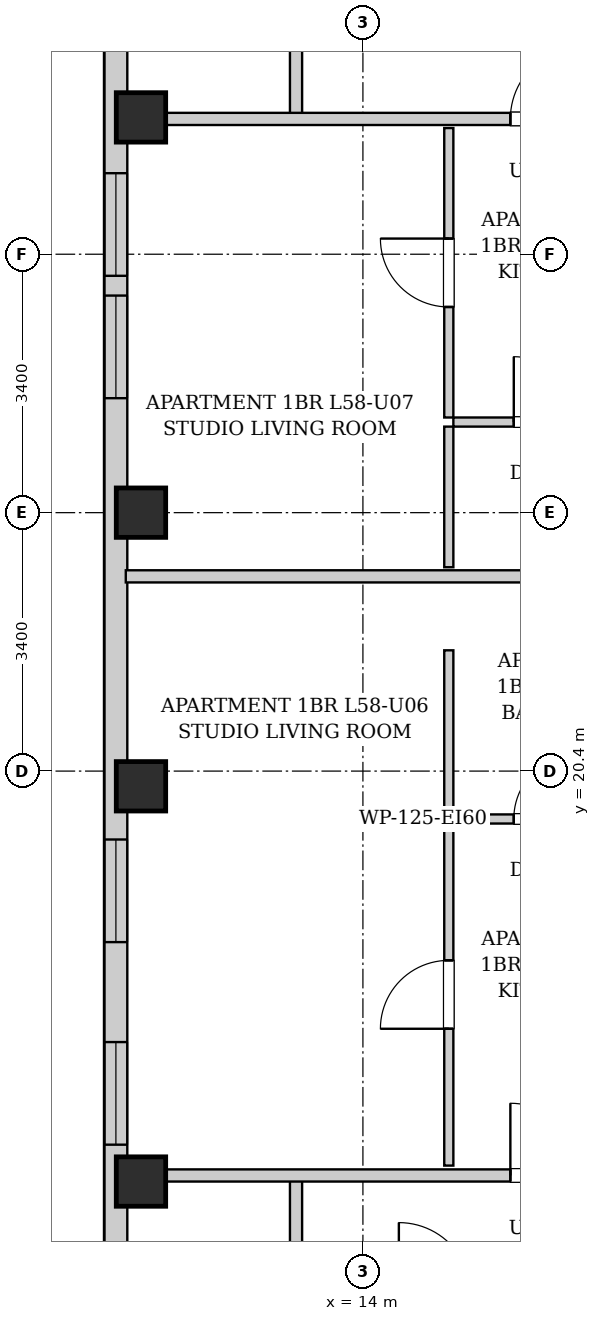
"""IFC4 building model, lengths in metres.
Left out: names, types, materials, properties, quantities, classifications, styles, units other than length and angle.
Written with IfcOpenShell. Run it as: python <this file> out.ifc"""

import sys

from ifc_helpers import new_model, si_unit, direction, frame, frame_2d, origin, origin_2d, place, context, subcontext, project, spatial, rectangle, extrude, element, fill, save


model = new_model("IFC4")
c1 = context("Model", 3, precision=1e-05, world=origin(), true_north=direction((0.0, 1.0)))
c2 = subcontext(c1, "Body", "Model", "MODEL_VIEW")
j1 = project(units=[si_unit("LENGTHUNIT", "METRE"), si_unit("PLANEANGLEUNIT", "RADIAN")], contexts=[c1])
p1 = place(None, origin())
s1 = spatial("IfcSite", under=j1, at=p1, CompositionType="ELEMENT")
p2 = place(p1, origin())
s2 = spatial("IfcBuilding", under=s1, at=p2, CompositionType="ELEMENT")
p3 = place(p2, frame((0.0, 0.0, 200.8)))
s3 = spatial("IfcBuildingStorey", under=s2, at=p3, CompositionType="ELEMENT", Elevation=200.8)
for number, where, z_axis, x_axis in (
    (1, (11.08, 15.0, 0.0), (0.0, 0.0, 1.0), (1.0, 0.0, 0.0)),
    (2, (11.08, 20.2, 0.0), (0.0, 0.0, 1.0), (1.0, 0.0, 0.0)),
    (3, (11.08, 23.8, 0.0), (0.0, 0.0, 1.0), (1.0, 0.0, 0.0)),
    (4, (11.08, 29.0, 0.0), (0.0, 0.0, 1.0), (1.0, 0.0, 0.0)),
):
    element("IfcColumn", number, at=place(p3, frame(where, z_axis=z_axis, x_axis=x_axis)), inside=s3, PredefinedType="COLUMN", context=c2, shape_type="SweptSolid", body=[
        extrude(rectangle(XDim=0.65, YDim=0.65, at=origin_2d()), origin(), (0.0, 0.0, 1.0), 3.3),
    ])
p4 = place(p3, frame((10.75, 6.3, 0.0), z_axis=(0.0, 0.0, 1.0), x_axis=(0.0, 1.0, 0.0)))
e5 = element("IfcWall", 5, at=p4, inside=s3, PredefinedType="SOLIDWALL", context=c2, shape_type="SweptSolid", body=[
    extrude(rectangle(XDim=31.4, YDim=0.3, at=frame_2d((15.7, 0.0))), origin(), (0.0, 0.0, 1.0), 3.04),
])
p5 = place(p4, frame((1.504, 0.0, 0.55)))
e6 = element("IfcOpeningElement", 6, at=p5, cuts=e5, PredefinedType="OPENING", context=c2, shape_type="SweptSolid", body=[
    extrude(rectangle(XDim=1.35, YDim=1.2, at=frame_2d((0.675, 0.6))), frame((0.0, 0.16, 0.0), z_axis=(0.0, -1.0, 0.0), x_axis=(1.0, 0.0, 0.0)), (0.0, 0.0, 1.0), 0.32),
])
p6 = place(p4, frame((28.546, 0.0, 0.55)))
e7 = element("IfcOpeningElement", 7, at=p6, cuts=e5, PredefinedType="OPENING", context=c2, shape_type="SweptSolid", body=[
    extrude(rectangle(XDim=1.35, YDim=1.2, at=frame_2d((0.675, 0.6))), frame((0.0, 0.16, 0.0), z_axis=(0.0, -1.0, 0.0), x_axis=(1.0, 0.0, 0.0)), (0.0, 0.0, 1.0), 0.32),
])
p7 = place(p4, frame((11.85, 0.0, 0.55)))
e8 = element("IfcOpeningElement", 8, at=p7, cuts=e5, PredefinedType="OPENING", context=c2, shape_type="SweptSolid", body=[
    extrude(rectangle(XDim=1.35, YDim=1.2, at=frame_2d((0.675, 0.6))), frame((0.0, 0.16, 0.0), z_axis=(0.0, -1.0, 0.0), x_axis=(1.0, 0.0, 0.0)), (0.0, 0.0, 1.0), 0.32),
])
p8 = place(p4, frame((9.185, 0.0, 0.55)))
e9 = element("IfcOpeningElement", 9, at=p8, cuts=e5, PredefinedType="OPENING", context=c2, shape_type="SweptSolid", body=[
    extrude(rectangle(XDim=1.35, YDim=1.2, at=frame_2d((0.675, 0.6))), frame((0.0, 0.16, 0.0), z_axis=(0.0, -1.0, 0.0), x_axis=(1.0, 0.0, 0.0)), (0.0, 0.0, 1.0), 0.32),
])
p9 = place(p4, frame((19.006, 0.0, 0.55)))
e10 = element("IfcOpeningElement", 10, at=p9, cuts=e5, PredefinedType="OPENING", context=c2, shape_type="SweptSolid", body=[
    extrude(rectangle(XDim=1.35, YDim=1.2, at=frame_2d((0.675, 0.6))), frame((0.0, 0.16, 0.0), z_axis=(0.0, -1.0, 0.0), x_axis=(1.0, 0.0, 0.0)), (0.0, 0.0, 1.0), 0.32),
])
p10 = place(p4, frame((20.616, 0.0, 0.55)))
e11 = element("IfcOpeningElement", 11, at=p10, cuts=e5, PredefinedType="OPENING", context=c2, shape_type="SweptSolid", body=[
    extrude(rectangle(XDim=1.35, YDim=1.2, at=frame_2d((0.675, 0.6))), frame((0.0, 0.16, 0.0), z_axis=(0.0, -1.0, 0.0), x_axis=(1.0, 0.0, 0.0)), (0.0, 0.0, 1.0), 0.32),
])
for number, where, z_axis, x_axis in (
    (12, (13.12, 13.51, 0.0), (0.0, 0.0, 1.0), (0.0, 1.0, 0.0)),
    (13, (13.12, 28.98, 0.0), (0.0, 0.0, 1.0), (0.0, 1.0, 0.0)),
):
    element("IfcWall", number, at=place(p3, frame(where, z_axis=z_axis, x_axis=x_axis)), inside=s3, PredefinedType="PARTITIONING", context=c2, shape_type="SweptSolid", body=[
        extrude(rectangle(XDim=1.58, YDim=0.16, at=frame_2d((0.79, 0.0))), origin(), (0.0, 0.0, 1.0), 3.04),
    ])
p11 = place(p3, frame((10.88, 15.08, 0.0), z_axis=(0.0, 0.0, 1.0), x_axis=(1.0, 0.0, 0.0)))
e14 = element("IfcWall", 14, at=p11, inside=s3, PredefinedType="PARTITIONING", context=c2, shape_type="SweptSolid", body=[
    extrude(rectangle(XDim=6.88, YDim=0.16, at=frame_2d((3.44, 0.0))), origin(), (0.0, 0.0, 1.0), 2.556),
])
p12 = place(p11, frame((5.06, 0.0, 0.0)))
e15 = element("IfcOpeningElement", 15, at=p12, cuts=e14, PredefinedType="OPENING", context=c2, shape_type="SweptSolid", body=[
    extrude(rectangle(XDim=0.95, YDim=2.1, at=frame_2d((0.475, 1.05))), frame((0.0, 0.09, 0.0), z_axis=(0.0, -1.0, 0.0), x_axis=(1.0, 0.0, 0.0)), (0.0, 0.0, 1.0), 0.18),
])
p13 = place(p3, frame((10.88, 22.962, 0.0), z_axis=(0.0, 0.0, 1.0), x_axis=(1.0, 0.0, 0.0)))
e16 = element("IfcWall", 16, at=p13, inside=s3, PredefinedType="PARTITIONING", context=c2, shape_type="SweptSolid", body=[
    extrude(rectangle(XDim=6.76, YDim=0.16, at=frame_2d((3.38, 0.0))), origin(), (0.0, 0.0, 1.0), 3.04),
])
p14 = place(p3, frame((15.19, 19.77, 0.0), z_axis=(0.0, 0.0, 1.0), x_axis=(1.0, 0.0, 0.0)))
e17 = element("IfcWall", 17, at=p14, inside=s3, PredefinedType="PARTITIONING", context=c2, shape_type="SweptSolid", body=[
    extrude(rectangle(XDim=2.45, YDim=0.12, at=frame_2d((1.225, 0.0))), origin(), (0.0, 0.0, 1.0), 3.04),
])
p15 = place(p14, frame((0.795, 0.0, 0.0)))
e18 = element("IfcOpeningElement", 18, at=p15, cuts=e17, PredefinedType="OPENING", context=c2, shape_type="SweptSolid", body=[
    extrude(rectangle(XDim=0.86, YDim=2.05, at=frame_2d((0.43, 1.025))), frame((0.0, 0.07, 0.0), z_axis=(0.0, -1.0, 0.0), x_axis=(1.0, 0.0, 0.0)), (0.0, 0.0, 1.0), 0.14),
])
p16 = place(p3, frame((15.13, 19.83, 0.0), z_axis=(0.0, 0.0, 1.0), x_axis=(0.0, 1.0, 0.0)))
e19 = element("IfcWall", 19, at=p16, inside=s3, PredefinedType="PARTITIONING", context=c2, shape_type="SweptSolid", body=[
    extrude(rectangle(XDim=2.159, YDim=0.12, at=frame_2d((1.08, 0.0))), origin(), (0.0, 0.0, 1.0), 3.04),
])
p17 = place(p3, frame((15.13, 15.21, 0.0), z_axis=(0.0, 0.0, 1.0), x_axis=(0.0, 1.0, 0.0)))
e20 = element("IfcWall", 20, at=p17, inside=s3, PredefinedType="PARTITIONING", context=c2, shape_type="SweptSolid", body=[
    extrude(rectangle(XDim=4.5, YDim=0.12, at=frame_2d((2.25, 0.0))), origin(), (0.0, 0.0, 1.0), 3.04),
])
p18 = place(p17, frame((1.8, 0.0, 0.0)))
e21 = element("IfcOpeningElement", 21, at=p18, cuts=e20, PredefinedType="OPENING", context=c2, shape_type="SweptSolid", body=[
    extrude(rectangle(XDim=0.9, YDim=2.05, at=frame_2d((0.45, 1.025))), frame((0.0, 0.07, 0.0), z_axis=(0.0, -1.0, 0.0), x_axis=(1.0, 0.0, 0.0)), (0.0, 0.0, 1.0), 0.14),
])
p19 = place(p3, frame((10.88, 28.98, 0.0), z_axis=(0.0, 0.0, 1.0), x_axis=(1.0, 0.0, 0.0)))
e22 = element("IfcWall", 22, at=p19, inside=s3, PredefinedType="PARTITIONING", context=c2, shape_type="SweptSolid", body=[
    extrude(rectangle(XDim=6.88, YDim=0.16, at=frame_2d((3.44, 0.0))), origin(), (0.0, 0.0, 1.0), 2.556),
])
p20 = place(p19, frame((5.06, 0.0, 0.0)))
e23 = element("IfcOpeningElement", 23, at=p20, cuts=e22, PredefinedType="OPENING", context=c2, shape_type="SweptSolid", body=[
    extrude(rectangle(XDim=0.95, YDim=2.1, at=frame_2d((0.475, 1.05))), frame((0.0, 0.09, 0.0), z_axis=(0.0, -1.0, 0.0), x_axis=(1.0, 0.0, 0.0)), (0.0, 0.0, 1.0), 0.18),
])
p21 = place(p3, frame((15.19, 24.992, 0.0), z_axis=(0.0, 0.0, 1.0), x_axis=(1.0, 0.0, 0.0)))
e24 = element("IfcWall", 24, at=p21, inside=s3, PredefinedType="PARTITIONING", context=c2, shape_type="SweptSolid", body=[
    extrude(rectangle(XDim=2.45, YDim=0.12, at=frame_2d((1.225, 0.0))), origin(), (0.0, 0.0, 1.0), 3.04),
])
p22 = place(p21, frame((0.795, 0.0, 0.0)))
e25 = element("IfcOpeningElement", 25, at=p22, cuts=e24, PredefinedType="OPENING", context=c2, shape_type="SweptSolid", body=[
    extrude(rectangle(XDim=0.86, YDim=2.05, at=frame_2d((0.43, 1.025))), frame((0.0, 0.07, 0.0), z_axis=(0.0, -1.0, 0.0), x_axis=(1.0, 0.0, 0.0)), (0.0, 0.0, 1.0), 0.14),
])
p23 = place(p3, frame((15.13, 23.082, 0.0), z_axis=(0.0, 0.0, 1.0), x_axis=(0.0, 1.0, 0.0)))
e26 = element("IfcWall", 26, at=p23, inside=s3, PredefinedType="PARTITIONING", context=c2, shape_type="SweptSolid", body=[
    extrude(rectangle(XDim=1.85, YDim=0.12, at=frame_2d((0.925, 0.0))), origin(), (0.0, 0.0, 1.0), 3.04),
])
p24 = place(p3, frame((15.13, 25.052, 0.0), z_axis=(0.0, 0.0, 1.0), x_axis=(0.0, 1.0, 0.0)))
e27 = element("IfcWall", 27, at=p24, inside=s3, PredefinedType="PARTITIONING", context=c2, shape_type="SweptSolid", body=[
    extrude(rectangle(XDim=3.808, YDim=0.12, at=frame_2d((1.904, 0.0))), origin(), (0.0, 0.0, 1.0), 3.04),
])
p25 = place(p24, frame((1.454, 0.0, 0.0)))
e28 = element("IfcOpeningElement", 28, at=p25, cuts=e27, PredefinedType="OPENING", context=c2, shape_type="SweptSolid", body=[
    extrude(rectangle(XDim=0.9, YDim=2.05, at=frame_2d((0.45, 1.025))), frame((0.0, 0.07, 0.0), z_axis=(0.0, -1.0, 0.0), x_axis=(1.0, 0.0, 0.0)), (0.0, 0.0, 1.0), 0.14),
])
p26 = place(p12, origin())
e29 = element("IfcDoor", 29, at=p26, inside=s3, OperationType="SINGLE_SWING_LEFT", PredefinedType="DOOR", context=c2, shape_type="SweptSolid", body=[
    extrude(rectangle(XDim=0.95, YDim=2.1, at=frame_2d((0.475, 1.05))), frame((0.0, 0.025, 0.0), z_axis=(0.0, -1.0, 0.0), x_axis=(1.0, 0.0, 0.0)), (0.0, 0.0, 1.0), 0.05),
])
fill(e15, e29)
p27 = place(p15, origin())
e30 = element("IfcDoor", 30, at=p27, inside=s3, OperationType="SINGLE_SWING_RIGHT", PredefinedType="DOOR", context=c2, shape_type="SweptSolid", body=[
    extrude(rectangle(XDim=0.86, YDim=2.05, at=frame_2d((0.43, 1.025))), frame((0.0, 0.025, 0.0), z_axis=(0.0, -1.0, 0.0), x_axis=(1.0, 0.0, 0.0)), (0.0, 0.0, 1.0), 0.05),
])
fill(e18, e30)
p28 = place(p18, origin())
e31 = element("IfcDoor", 31, at=p28, inside=s3, OperationType="SINGLE_SWING_LEFT", PredefinedType="DOOR", context=c2, shape_type="SweptSolid", body=[
    extrude(rectangle(XDim=0.9, YDim=2.05, at=frame_2d((0.45, 1.025))), frame((0.0, 0.025, 0.0), z_axis=(0.0, -1.0, 0.0), x_axis=(1.0, 0.0, 0.0)), (0.0, 0.0, 1.0), 0.05),
])
fill(e21, e31)
p29 = place(p20, origin())
e32 = element("IfcDoor", 32, at=p29, inside=s3, OperationType="SINGLE_SWING_RIGHT", PredefinedType="DOOR", context=c2, shape_type="SweptSolid", body=[
    extrude(rectangle(XDim=0.95, YDim=2.1, at=frame_2d((0.475, 1.05))), frame((0.0, 0.025, 0.0), z_axis=(0.0, -1.0, 0.0), x_axis=(1.0, 0.0, 0.0)), (0.0, 0.0, 1.0), 0.05),
])
fill(e23, e32)
p30 = place(p22, origin())
e33 = element("IfcDoor", 33, at=p30, inside=s3, OperationType="SINGLE_SWING_LEFT", PredefinedType="DOOR", context=c2, shape_type="SweptSolid", body=[
    extrude(rectangle(XDim=0.86, YDim=2.05, at=frame_2d((0.43, 1.025))), frame((0.0, 0.025, 0.0), z_axis=(0.0, -1.0, 0.0), x_axis=(1.0, 0.0, 0.0)), (0.0, 0.0, 1.0), 0.05),
])
fill(e25, e33)
p31 = place(p25, origin())
e34 = element("IfcDoor", 34, at=p31, inside=s3, OperationType="SINGLE_SWING_RIGHT", PredefinedType="DOOR", context=c2, shape_type="SweptSolid", body=[
    extrude(rectangle(XDim=0.9, YDim=2.05, at=frame_2d((0.45, 1.025))), frame((0.0, 0.025, 0.0), z_axis=(0.0, -1.0, 0.0), x_axis=(1.0, 0.0, 0.0)), (0.0, 0.0, 1.0), 0.05),
])
fill(e28, e34)
p32 = place(p7, origin())
e35 = element("IfcWindow", 35, at=p32, inside=s3, PartitioningType="SINGLE_PANEL", PredefinedType="WINDOW", context=c2, shape_type="SweptSolid", body=[
    extrude(rectangle(XDim=1.35, YDim=1.2, at=frame_2d((0.675, 0.6))), frame((0.0, 0.03, 0.0), z_axis=(0.0, -1.0, 0.0), x_axis=(1.0, 0.0, 0.0)), (0.0, 0.0, 1.0), 0.06),
])
fill(e8, e35)
p33 = place(p8, origin())
e36 = element("IfcWindow", 36, at=p33, inside=s3, PartitioningType="SINGLE_PANEL", PredefinedType="WINDOW", context=c2, shape_type="SweptSolid", body=[
    extrude(rectangle(XDim=1.35, YDim=1.2, at=frame_2d((0.675, 0.6))), frame((0.0, 0.03, 0.0), z_axis=(0.0, -1.0, 0.0), x_axis=(1.0, 0.0, 0.0)), (0.0, 0.0, 1.0), 0.06),
])
fill(e9, e36)
p34 = place(p9, origin())
e37 = element("IfcWindow", 37, at=p34, inside=s3, PartitioningType="SINGLE_PANEL", PredefinedType="WINDOW", context=c2, shape_type="SweptSolid", body=[
    extrude(rectangle(XDim=1.35, YDim=1.2, at=frame_2d((0.675, 0.6))), frame((0.0, 0.03, 0.0), z_axis=(0.0, -1.0, 0.0), x_axis=(1.0, 0.0, 0.0)), (0.0, 0.0, 1.0), 0.06),
])
fill(e10, e37)
p35 = place(p10, origin())
e38 = element("IfcWindow", 38, at=p35, inside=s3, PartitioningType="SINGLE_PANEL", PredefinedType="WINDOW", context=c2, shape_type="SweptSolid", body=[
    extrude(rectangle(XDim=1.35, YDim=1.2, at=frame_2d((0.675, 0.6))), frame((0.0, 0.03, 0.0), z_axis=(0.0, -1.0, 0.0), x_axis=(1.0, 0.0, 0.0)), (0.0, 0.0, 1.0), 0.06),
])
fill(e11, e38)
save(model, sys.argv[1])
